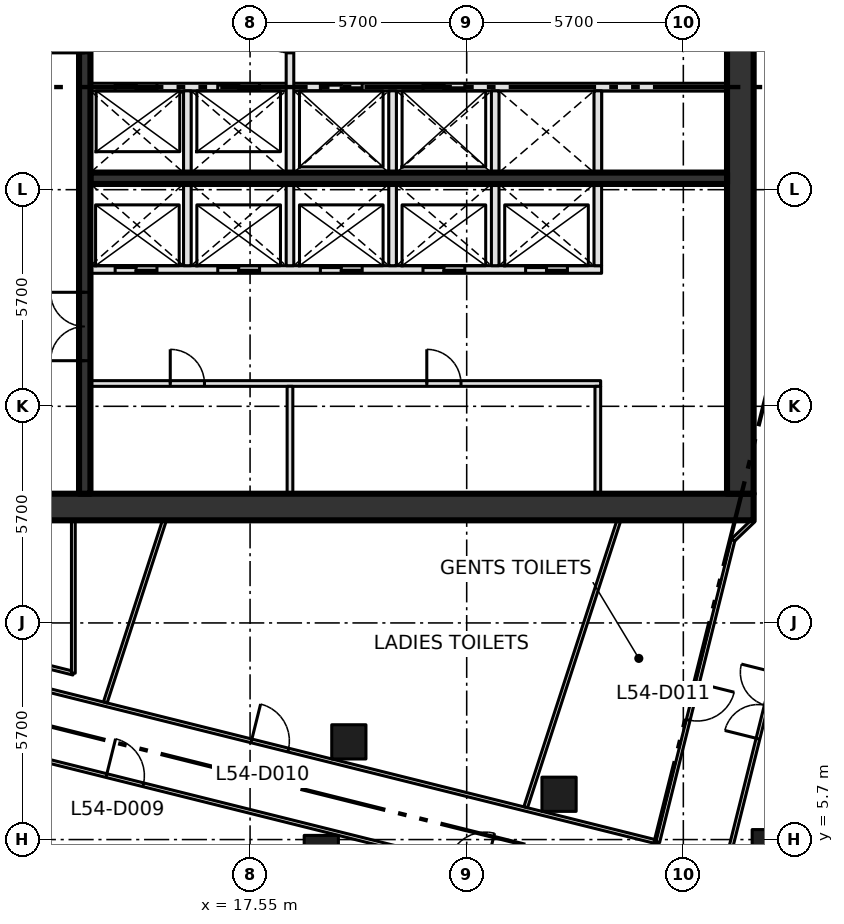
"""IFC4 building model, lengths in metres.
Left out: names, types, materials, properties, quantities, classifications, styles, units other than length and angle.
Written with IfcOpenShell. Run it as: python <this file> out.ifc"""

import sys

from ifc_helpers import new_model, si_unit, direction, frame, frame_2d, origin, origin_2d, place, context, subcontext, project, spatial, rectangle, extrude, element, fill, save


model = new_model("IFC4")
c1 = context("Model", 3, precision=1e-05, world=origin(), true_north=direction((0.0, 1.0)))
c2 = subcontext(c1, "Body", "Model", "MODEL_VIEW")
j1 = project(units=[si_unit("LENGTHUNIT", "METRE"), si_unit("PLANEANGLEUNIT", "RADIAN")], contexts=[c1])
p1 = place(None, origin())
s1 = spatial("IfcSite", under=j1, at=p1, CompositionType="ELEMENT")
p2 = place(p1, origin())
s2 = spatial("IfcBuilding", under=s1, at=p2, CompositionType="ELEMENT")
p3 = place(p2, frame((0.0, 0.0, 238.2)))
s3 = spatial("IfcBuildingStorey", under=s2, at=p3, CompositionType="ELEMENT", Elevation=238.2)
for number, where, z_axis, x_axis in (
    (1, (19.424, 5.36, 0.0), (0.0, 0.0, 1.0), (1.0, 0.0, 0.0)),
    (2, (20.149, 8.271, 0.0), (0.0, 0.0, 1.0), (1.0, 0.0, 0.0)),
    (3, (25.68, 6.892, 0.0), (0.0, 0.0, 1.0), (1.0, 0.0, 0.0)),
    (4, (31.211, 5.513, 0.0), (0.0, 0.0, 1.0), (1.0, 0.0, 0.0)),
):
    element("IfcColumn", number, at=place(p3, frame(where, z_axis=z_axis, x_axis=x_axis)), inside=s3, PredefinedType="COLUMN", context=c2, shape_type="SweptSolid", body=[
        extrude(rectangle(XDim=0.9, YDim=0.9, at=origin_2d()), origin(), (0.0, 0.0, 1.0), 4.2),
    ])
p4 = place(p3, frame((8.0, 14.45, -0.3), z_axis=(0.0, 0.0, 1.0), x_axis=(1.0, 0.0, 0.0)))
e5 = element("IfcWall", 5, at=p4, inside=s3, PredefinedType="SHEAR", context=c2, shape_type="SweptSolid", body=[
    extrude(rectangle(XDim=22.8, YDim=0.7, at=frame_2d((11.4, 0.0))), origin(), (0.0, 0.0, 1.0), 4.2),
])
p5 = place(p4, frame((2.3, 0.0, 0.3)))
e6 = element("IfcOpeningElement", 6, at=p5, cuts=e5, PredefinedType="OPENING", context=c2, shape_type="SweptSolid", body=[
    extrude(rectangle(XDim=1.8, YDim=2.1, at=frame_2d((0.9, 1.05))), frame((0.0, 0.36, 0.0), z_axis=(0.0, -1.0, 0.0), x_axis=(1.0, 0.0, 0.0)), (0.0, 0.0, 1.0), 0.72),
])
p6 = place(p3, frame((30.45, 14.8, -0.3), z_axis=(0.0, 0.0, 1.0), x_axis=(0.0, 1.0, 0.0)))
e7 = element("IfcWall", 7, at=p6, inside=s3, PredefinedType="SHEAR", context=c2, shape_type="SweptSolid", body=[
    extrude(rectangle(XDim=20.9, YDim=0.7, at=frame_2d((10.45, 0.0))), origin(), (0.0, 0.0, 1.0), 4.2),
])
p7 = place(p3, frame((13.35, 17.7, 0.0), z_axis=(0.0, 0.0, 1.0), x_axis=(1.0, 0.0, 0.0)))
e8 = element("IfcWall", 8, at=p7, inside=s3, PredefinedType="PARTITIONING", context=c2, shape_type="SweptSolid", body=[
    extrude(rectangle(XDim=13.425, YDim=0.15, at=frame_2d((6.712, 0.0))), origin(), (0.0, 0.0, 1.0), 3.9),
])
p8 = place(p7, frame((2.1, 0.0, 0.0)))
e9 = element("IfcOpeningElement", 9, at=p8, cuts=e8, PredefinedType="OPENING", context=c2, shape_type="SweptSolid", body=[
    extrude(rectangle(XDim=0.9, YDim=2.1, at=frame_2d((0.45, 1.05))), frame((0.0, 0.085, 0.0), z_axis=(0.0, -1.0, 0.0), x_axis=(1.0, 0.0, 0.0)), (0.0, 0.0, 1.0), 0.17),
])
p9 = place(p7, frame((8.85, 0.0, 0.0)))
e10 = element("IfcOpeningElement", 10, at=p9, cuts=e8, PredefinedType="OPENING", context=c2, shape_type="SweptSolid", body=[
    extrude(rectangle(XDim=0.9, YDim=2.1, at=frame_2d((0.45, 1.05))), frame((0.0, 0.085, 0.0), z_axis=(0.0, -1.0, 0.0), x_axis=(1.0, 0.0, 0.0)), (0.0, 0.0, 1.0), 0.17),
])
p10 = place(p3, frame((13.35, 20.7, 0.0), z_axis=(0.0, 0.0, 1.0), x_axis=(1.0, 0.0, 0.0)))
e11 = element("IfcWall", 11, at=p10, inside=s3, PredefinedType="SOLIDWALL", context=c2, shape_type="SweptSolid", body=[
    extrude(rectangle(XDim=13.45, YDim=0.2, at=frame_2d((6.725, 0.0))), origin(), (0.0, 0.0, 1.0), 3.9),
])
p11 = place(p10, frame((0.65, 0.0, 0.0)))
e12 = element("IfcOpeningElement", 12, at=p11, cuts=e11, PredefinedType="OPENING", context=c2, shape_type="SweptSolid", body=[
    extrude(rectangle(XDim=1.1, YDim=2.1, at=frame_2d((0.55, 1.05))), frame((0.0, 0.11, 0.0), z_axis=(0.0, -1.0, 0.0), x_axis=(1.0, 0.0, 0.0)), (0.0, 0.0, 1.0), 0.22),
])
p12 = place(p10, frame((3.35, 0.0, 0.0)))
e13 = element("IfcOpeningElement", 13, at=p12, cuts=e11, PredefinedType="OPENING", context=c2, shape_type="SweptSolid", body=[
    extrude(rectangle(XDim=1.1, YDim=2.1, at=frame_2d((0.55, 1.05))), frame((0.0, 0.11, 0.0), z_axis=(0.0, -1.0, 0.0), x_axis=(1.0, 0.0, 0.0)), (0.0, 0.0, 1.0), 0.22),
])
p13 = place(p10, frame((6.05, 0.0, 0.0)))
e14 = element("IfcOpeningElement", 14, at=p13, cuts=e11, PredefinedType="OPENING", context=c2, shape_type="SweptSolid", body=[
    extrude(rectangle(XDim=1.1, YDim=2.1, at=frame_2d((0.55, 1.05))), frame((0.0, 0.11, 0.0), z_axis=(0.0, -1.0, 0.0), x_axis=(1.0, 0.0, 0.0)), (0.0, 0.0, 1.0), 0.22),
])
p14 = place(p10, frame((8.75, 0.0, 0.0)))
e15 = element("IfcOpeningElement", 15, at=p14, cuts=e11, PredefinedType="OPENING", context=c2, shape_type="SweptSolid", body=[
    extrude(rectangle(XDim=1.1, YDim=2.1, at=frame_2d((0.55, 1.05))), frame((0.0, 0.11, 0.0), z_axis=(0.0, -1.0, 0.0), x_axis=(1.0, 0.0, 0.0)), (0.0, 0.0, 1.0), 0.22),
])
p15 = place(p10, frame((11.45, 0.0, 0.0)))
e16 = element("IfcOpeningElement", 16, at=p15, cuts=e11, PredefinedType="OPENING", context=c2, shape_type="SweptSolid", body=[
    extrude(rectangle(XDim=1.1, YDim=2.1, at=frame_2d((0.55, 1.05))), frame((0.0, 0.11, 0.0), z_axis=(0.0, -1.0, 0.0), x_axis=(1.0, 0.0, 0.0)), (0.0, 0.0, 1.0), 0.22),
])
p16 = place(p3, frame((13.35, 23.1, 0.0), z_axis=(0.0, 0.0, 1.0), x_axis=(1.0, 0.0, 0.0)))
e17 = element("IfcWall", 17, at=p16, inside=s3, PredefinedType="SHEAR", context=c2, shape_type="SweptSolid", body=[
    extrude(rectangle(XDim=16.75, YDim=0.3, at=frame_2d((8.375, 0.0))), origin(), (0.0, 0.0, 1.0), 3.9),
])
p17 = place(p3, frame((13.35, 25.5, 0.0), z_axis=(0.0, 0.0, 1.0), x_axis=(1.0, 0.0, 0.0)))
e18 = element("IfcWall", 18, at=p17, inside=s3, PredefinedType="SOLIDWALL", context=c2, shape_type="SweptSolid", body=[
    extrude(rectangle(XDim=16.75, YDim=0.2, at=frame_2d((8.375, 0.0))), origin(), (0.0, 0.0, 1.0), 3.9),
])
p18 = place(p17, frame((0.65, 0.0, 0.0)))
e19 = element("IfcOpeningElement", 19, at=p18, cuts=e18, PredefinedType="OPENING", context=c2, shape_type="SweptSolid", body=[
    extrude(rectangle(XDim=1.1, YDim=2.1, at=frame_2d((0.55, 1.05))), frame((0.0, 0.11, 0.0), z_axis=(0.0, -1.0, 0.0), x_axis=(1.0, 0.0, 0.0)), (0.0, 0.0, 1.0), 0.22),
])
p19 = place(p17, frame((3.35, 0.0, 0.0)))
e20 = element("IfcOpeningElement", 20, at=p19, cuts=e18, PredefinedType="OPENING", context=c2, shape_type="SweptSolid", body=[
    extrude(rectangle(XDim=1.1, YDim=2.1, at=frame_2d((0.55, 1.05))), frame((0.0, 0.11, 0.0), z_axis=(0.0, -1.0, 0.0), x_axis=(1.0, 0.0, 0.0)), (0.0, 0.0, 1.0), 0.22),
])
p20 = place(p17, frame((6.05, 0.0, 0.0)))
e21 = element("IfcOpeningElement", 21, at=p20, cuts=e18, PredefinedType="OPENING", context=c2, shape_type="SweptSolid", body=[
    extrude(rectangle(XDim=1.1, YDim=2.1, at=frame_2d((0.55, 1.05))), frame((0.0, 0.11, 0.0), z_axis=(0.0, -1.0, 0.0), x_axis=(1.0, 0.0, 0.0)), (0.0, 0.0, 1.0), 0.22),
])
p21 = place(p17, frame((8.75, 0.0, 0.0)))
e22 = element("IfcOpeningElement", 22, at=p21, cuts=e18, PredefinedType="OPENING", context=c2, shape_type="SweptSolid", body=[
    extrude(rectangle(XDim=1.1, YDim=2.1, at=frame_2d((0.55, 1.05))), frame((0.0, 0.11, 0.0), z_axis=(0.0, -1.0, 0.0), x_axis=(1.0, 0.0, 0.0)), (0.0, 0.0, 1.0), 0.22),
])
p22 = place(p3, frame((13.2, 14.8, 0.0), z_axis=(0.0, 0.0, 1.0), x_axis=(0.0, 1.0, 0.0)))
e23 = element("IfcWall", 23, at=p22, inside=s3, PredefinedType="SHEAR", context=c2, shape_type="SweptSolid", body=[
    extrude(rectangle(XDim=20.9, YDim=0.3, at=frame_2d((10.45, 0.0))), origin(), (0.0, 0.0, 1.0), 3.9),
])
p23 = place(p22, frame((3.5, 0.0, 0.0)))
e24 = element("IfcOpeningElement", 24, at=p23, cuts=e23, PredefinedType="OPENING", context=c2, shape_type="SweptSolid", body=[
    extrude(rectangle(XDim=1.8, YDim=2.1, at=frame_2d((0.9, 1.05))), frame((0.0, 0.16, 0.0), z_axis=(0.0, -1.0, 0.0), x_axis=(1.0, 0.0, 0.0)), (0.0, 0.0, 1.0), 0.32),
])
p24 = place(p22, frame((11.6, 0.0, 0.0)))
e25 = element("IfcOpeningElement", 25, at=p24, cuts=e23, PredefinedType="OPENING", context=c2, shape_type="SweptSolid", body=[
    extrude(rectangle(XDim=1.2, YDim=2.1, at=frame_2d((0.6, 1.05))), frame((0.0, 0.16, 0.0), z_axis=(0.0, -1.0, 0.0), x_axis=(1.0, 0.0, 0.0)), (0.0, 0.0, 1.0), 0.32),
])
p25 = place(p3, frame((15.9, 20.8, 0.0), z_axis=(0.0, 0.0, 1.0), x_axis=(0.0, 1.0, 0.0)))
e26 = element("IfcWall", 26, at=p25, inside=s3, PredefinedType="SOLIDWALL", context=c2, shape_type="SweptSolid", body=[
    extrude(rectangle(XDim=4.6, YDim=0.2, at=frame_2d((2.3, 0.0))), origin(), (0.0, 0.0, 1.0), 3.9),
])
p26 = place(p3, frame((18.6, 14.8, 0.0), z_axis=(0.0, 0.0, 1.0), x_axis=(0.0, 1.0, 0.0)))
e27 = element("IfcWall", 27, at=p26, inside=s3, PredefinedType="PARTITIONING", context=c2, shape_type="SweptSolid", body=[
    extrude(rectangle(XDim=2.825, YDim=0.15, at=frame_2d((1.413, 0.0))), origin(), (0.0, 0.0, 1.0), 3.9),
])
p27 = place(p3, frame((18.6, 20.8, 0.0), z_axis=(0.0, 0.0, 1.0), x_axis=(0.0, 1.0, 0.0)))
e28 = element("IfcWall", 28, at=p27, inside=s3, PredefinedType="SOLIDWALL", context=c2, shape_type="SweptSolid", body=[
    extrude(rectangle(XDim=7.6, YDim=0.2, at=frame_2d((3.8, 0.0))), origin(), (0.0, 0.0, 1.0), 3.9),
])
p28 = place(p27, frame((5.6, 0.0, 0.0)))
e29 = element("IfcOpeningElement", 29, at=p28, cuts=e28, PredefinedType="OPENING", context=c2, shape_type="SweptSolid", body=[
    extrude(rectangle(XDim=1.2, YDim=2.1, at=frame_2d((0.6, 1.05))), frame((0.0, 0.11, 0.0), z_axis=(0.0, -1.0, 0.0), x_axis=(1.0, 0.0, 0.0)), (0.0, 0.0, 1.0), 0.22),
])
for number, where, z_axis, x_axis in (
    (30, (21.3, 20.8, 0.0), (0.0, 0.0, 1.0), (0.0, 1.0, 0.0)),
    (31, (24.0, 20.8, 0.0), (0.0, 0.0, 1.0), (0.0, 1.0, 0.0)),
):
    element("IfcWall", number, at=place(p3, frame(where, z_axis=z_axis, x_axis=x_axis)), inside=s3, PredefinedType="SOLIDWALL", context=c2, shape_type="SweptSolid", body=[
        extrude(rectangle(XDim=4.6, YDim=0.2, at=frame_2d((2.3, 0.0))), origin(), (0.0, 0.0, 1.0), 3.9),
    ])
p29 = place(p3, frame((26.7, 14.8, 0.0), z_axis=(0.0, 0.0, 1.0), x_axis=(0.0, 1.0, 0.0)))
e32 = element("IfcWall", 32, at=p29, inside=s3, PredefinedType="PARTITIONING", context=c2, shape_type="SweptSolid", body=[
    extrude(rectangle(XDim=2.825, YDim=0.15, at=frame_2d((1.413, 0.0))), origin(), (0.0, 0.0, 1.0), 3.9),
])
p30 = place(p3, frame((26.7, 20.8, 0.0), z_axis=(0.0, 0.0, 1.0), x_axis=(0.0, 1.0, 0.0)))
e33 = element("IfcWall", 33, at=p30, inside=s3, PredefinedType="SOLIDWALL", context=c2, shape_type="SweptSolid", body=[
    extrude(rectangle(XDim=4.6, YDim=0.2, at=frame_2d((2.3, 0.0))), origin(), (0.0, 0.0, 1.0), 3.9),
])
p31 = place(p3, frame((8.55, 8.685, 0.0), z_axis=(0.0, 0.0, 1.0), x_axis=(0.970297603286, -0.241914367199, 0.0)))
e34 = element("IfcWall", 34, at=p31, inside=s3, PredefinedType="PARTITIONING", context=c2, shape_type="SweptSolid", body=[
    extrude(rectangle(XDim=50.675, YDim=0.1, at=frame_2d((25.337, 0.0))), origin(), (0.0, 0.0, 1.0), 3.9),
])
p32 = place(p31, frame((35.657, 0.0, 0.0)))
e35 = element("IfcOpeningElement", 35, at=p32, cuts=e34, PredefinedType="OPENING", context=c2, shape_type="SweptSolid", body=[
    extrude(rectangle(XDim=1.8, YDim=2.1, at=frame_2d((0.9, 1.05))), frame((0.0, 0.06, 0.0), z_axis=(0.0, -1.0, 0.0), x_axis=(1.0, 0.0, 0.0)), (0.0, 0.0, 1.0), 0.12),
])
p33 = place(p31, frame((14.657, 0.0, 0.0)))
e36 = element("IfcOpeningElement", 36, at=p33, cuts=e34, PredefinedType="OPENING", context=c2, shape_type="SweptSolid", body=[
    extrude(rectangle(XDim=1.0, YDim=2.1, at=frame_2d((0.5, 1.05))), frame((0.0, 0.06, 0.0), z_axis=(0.0, -1.0, 0.0), x_axis=(1.0, 0.0, 0.0)), (0.0, 0.0, 1.0), 0.12),
])
p34 = place(p31, frame((19.357, 0.0, 0.0)))
e37 = element("IfcOpeningElement", 37, at=p34, cuts=e34, PredefinedType="OPENING", context=c2, shape_type="SweptSolid", body=[
    extrude(rectangle(XDim=1.8, YDim=2.1, at=frame_2d((0.9, 1.05))), frame((0.0, 0.06, 0.0), z_axis=(0.0, -1.0, 0.0), x_axis=(1.0, 0.0, 0.0)), (0.0, 0.0, 1.0), 0.12),
])
p35 = place(p31, frame((5.38, 0.0, 0.0)))
e38 = element("IfcOpeningElement", 38, at=p35, cuts=e34, PredefinedType="OPENING", context=c2, shape_type="SweptSolid", body=[
    extrude(rectangle(XDim=1.0, YDim=2.1, at=frame_2d((0.5, 1.05))), frame((0.0, 0.06, 0.0), z_axis=(0.0, -1.0, 0.0), x_axis=(1.0, 0.0, 0.0)), (0.0, 0.0, 1.0), 0.12),
])
p36 = place(p3, frame((8.988, 10.44, 0.0), z_axis=(0.0, 0.0, 1.0), x_axis=(0.970301223092, -0.241899848006, 0.0)))
e39 = element("IfcWall", 39, at=p36, inside=s3, PredefinedType="PARTITIONING", context=c2, shape_type="SweptSolid", body=[
    extrude(rectangle(XDim=19.879, YDim=0.1, at=frame_2d((9.94, 0.0))), origin(), (0.0, 0.0, 1.0), 3.9),
])
p37 = place(p36, frame((8.861, 0.0, 0.0)))
e40 = element("IfcOpeningElement", 40, at=p37, cuts=e39, PredefinedType="OPENING", context=c2, shape_type="SweptSolid", body=[
    extrude(rectangle(XDim=1.0, YDim=2.1, at=frame_2d((0.5, 1.05))), frame((0.0, 0.06, 0.0), z_axis=(0.0, -1.0, 0.0), x_axis=(1.0, 0.0, 0.0)), (0.0, 0.0, 1.0), 0.12),
])
p38 = place(p3, frame((9.9, 10.826, 0.0), z_axis=(0.0, 0.0, 1.0), x_axis=(0.970290953223, -0.241941038466, 0.0)))
e41 = element("IfcWall", 41, at=p38, inside=s3, PredefinedType="PARTITIONING", context=c2, shape_type="SweptSolid", body=[
    extrude(rectangle(XDim=3.092, YDim=0.1, at=frame_2d((1.546, 0.0))), origin(), (0.0, 0.0, 1.0), 3.9),
])
p39 = place(p3, frame((12.9, 10.078, 0.0), z_axis=(0.0, 0.0, 1.0), x_axis=(0.0, 1.0, 0.0)))
e42 = element("IfcWall", 42, at=p39, inside=s3, PredefinedType="PARTITIONING", context=c2, shape_type="SweptSolid", body=[
    extrude(rectangle(XDim=4.022, YDim=0.1, at=frame_2d((2.011, 0.0))), origin(), (0.0, 0.0, 1.0), 3.9),
])
p40 = place(p3, frame((30.12, 5.171, 0.0), z_axis=(0.0, 0.0, 1.0), x_axis=(0.241902913229, 0.970300458915, 0.0)))
e43 = element("IfcWall", 43, at=p40, inside=s3, PredefinedType="PARTITIONING", context=c2, shape_type="SweptSolid", body=[
    extrude(rectangle(XDim=8.172, YDim=0.1, at=frame_2d((4.086, 0.0))), origin(), (0.0, 0.0, 1.0), 3.9),
])
p41 = place(p40, frame((3.28, 0.0, 0.0)))
e44 = element("IfcOpeningElement", 44, at=p41, cuts=e43, PredefinedType="OPENING", context=c2, shape_type="SweptSolid", body=[
    extrude(rectangle(XDim=1.8, YDim=2.1, at=frame_2d((0.9, 1.05))), frame((0.0, 0.06, 0.0), z_axis=(0.0, -1.0, 0.0), x_axis=(1.0, 0.0, 0.0)), (0.0, 0.0, 1.0), 0.12),
])
p42 = place(p3, frame((30.259, 13.583, 0.0), z_axis=(0.0, 0.0, 1.0), x_axis=(-0.241841612879, -0.970315739479, 0.0)))
e45 = element("IfcWall", 45, at=p42, inside=s3, PredefinedType="PARTITIONING", context=c2, shape_type="SweptSolid", body=[
    extrude(rectangle(XDim=8.195, YDim=0.1, at=frame_2d((4.098, 0.0))), origin(), (0.0, 0.0, 1.0), 3.9),
])
p43 = place(p42, frame((3.88, 0.0, 0.0)))
e46 = element("IfcOpeningElement", 46, at=p43, cuts=e45, PredefinedType="OPENING", context=c2, shape_type="SweptSolid", body=[
    extrude(rectangle(XDim=1.0, YDim=2.1, at=frame_2d((0.5, 1.05))), frame((0.0, 0.06, 0.0), z_axis=(0.0, -1.0, 0.0), x_axis=(1.0, 0.0, 0.0)), (0.0, 0.0, 1.0), 0.12),
])
p44 = place(p3, frame((30.8, 14.1, 0.0), z_axis=(0.0, 0.0, 1.0), x_axis=(-0.722911025189, -0.690941133281, 0.0)))
e47 = element("IfcWall", 47, at=p44, inside=s3, PredefinedType="PARTITIONING", context=c2, shape_type="SweptSolid", body=[
    extrude(rectangle(XDim=0.748, YDim=0.1, at=frame_2d((0.374, 0.0))), origin(), (0.0, 0.0, 1.0), 3.9),
])
p45 = place(p3, frame((13.741, 9.31, 0.0), z_axis=(0.0, 0.0, 1.0), x_axis=(0.308976461467, 0.95106968528, 0.0)))
e48 = element("IfcWall", 48, at=p45, inside=s3, PredefinedType="PARTITIONING", context=c2, shape_type="SweptSolid", body=[
    extrude(rectangle(XDim=5.036, YDim=0.1, at=frame_2d((2.518, 0.0))), origin(), (0.0, 0.0, 1.0), 3.9),
])
p46 = place(p3, frame((24.803, 6.552, 0.0), z_axis=(0.0, 0.0, 1.0), x_axis=(0.308946255954, 0.951079497693, 0.0)))
e49 = element("IfcWall", 49, at=p46, inside=s3, PredefinedType="PARTITIONING", context=c2, shape_type="SweptSolid", body=[
    extrude(rectangle(XDim=7.936, YDim=0.1, at=frame_2d((3.968, 0.0))), origin(), (0.0, 0.0, 1.0), 3.9),
])
p47 = place(p11, origin())
e50 = element("IfcDoor", 50, at=p47, inside=s3, OperationType="SLIDING_TO_LEFT", PredefinedType="DOOR", context=c2, shape_type="SweptSolid", body=[
    extrude(rectangle(XDim=1.1, YDim=2.1, at=frame_2d((0.55, 1.05))), frame((0.0, 0.025, 0.0), z_axis=(0.0, -1.0, 0.0), x_axis=(1.0, 0.0, 0.0)), (0.0, 0.0, 1.0), 0.05),
])
fill(e12, e50)
p48 = place(p12, origin())
e51 = element("IfcDoor", 51, at=p48, inside=s3, OperationType="SLIDING_TO_LEFT", PredefinedType="DOOR", context=c2, shape_type="SweptSolid", body=[
    extrude(rectangle(XDim=1.1, YDim=2.1, at=frame_2d((0.55, 1.05))), frame((0.0, 0.025, 0.0), z_axis=(0.0, -1.0, 0.0), x_axis=(1.0, 0.0, 0.0)), (0.0, 0.0, 1.0), 0.05),
])
fill(e13, e51)
p49 = place(p13, origin())
e52 = element("IfcDoor", 52, at=p49, inside=s3, OperationType="SLIDING_TO_LEFT", PredefinedType="DOOR", context=c2, shape_type="SweptSolid", body=[
    extrude(rectangle(XDim=1.1, YDim=2.1, at=frame_2d((0.55, 1.05))), frame((0.0, 0.025, 0.0), z_axis=(0.0, -1.0, 0.0), x_axis=(1.0, 0.0, 0.0)), (0.0, 0.0, 1.0), 0.05),
])
fill(e14, e52)
p50 = place(p14, origin())
e53 = element("IfcDoor", 53, at=p50, inside=s3, OperationType="SLIDING_TO_LEFT", PredefinedType="DOOR", context=c2, shape_type="SweptSolid", body=[
    extrude(rectangle(XDim=1.1, YDim=2.1, at=frame_2d((0.55, 1.05))), frame((0.0, 0.025, 0.0), z_axis=(0.0, -1.0, 0.0), x_axis=(1.0, 0.0, 0.0)), (0.0, 0.0, 1.0), 0.05),
])
fill(e15, e53)
p51 = place(p15, origin())
e54 = element("IfcDoor", 54, at=p51, inside=s3, OperationType="SLIDING_TO_LEFT", PredefinedType="DOOR", context=c2, shape_type="SweptSolid", body=[
    extrude(rectangle(XDim=1.1, YDim=2.1, at=frame_2d((0.55, 1.05))), frame((0.0, 0.025, 0.0), z_axis=(0.0, -1.0, 0.0), x_axis=(1.0, 0.0, 0.0)), (0.0, 0.0, 1.0), 0.05),
])
fill(e16, e54)
p52 = place(p18, origin())
e55 = element("IfcDoor", 55, at=p52, inside=s3, OperationType="SLIDING_TO_LEFT", PredefinedType="DOOR", context=c2, shape_type="SweptSolid", body=[
    extrude(rectangle(XDim=1.1, YDim=2.1, at=frame_2d((0.55, 1.05))), frame((0.0, 0.025, 0.0), z_axis=(0.0, -1.0, 0.0), x_axis=(1.0, 0.0, 0.0)), (0.0, 0.0, 1.0), 0.05),
])
fill(e19, e55)
p53 = place(p19, origin())
e56 = element("IfcDoor", 56, at=p53, inside=s3, OperationType="SLIDING_TO_LEFT", PredefinedType="DOOR", context=c2, shape_type="SweptSolid", body=[
    extrude(rectangle(XDim=1.1, YDim=2.1, at=frame_2d((0.55, 1.05))), frame((0.0, 0.025, 0.0), z_axis=(0.0, -1.0, 0.0), x_axis=(1.0, 0.0, 0.0)), (0.0, 0.0, 1.0), 0.05),
])
fill(e20, e56)
p54 = place(p20, origin())
e57 = element("IfcDoor", 57, at=p54, inside=s3, OperationType="SLIDING_TO_LEFT", PredefinedType="DOOR", context=c2, shape_type="SweptSolid", body=[
    extrude(rectangle(XDim=1.1, YDim=2.1, at=frame_2d((0.55, 1.05))), frame((0.0, 0.025, 0.0), z_axis=(0.0, -1.0, 0.0), x_axis=(1.0, 0.0, 0.0)), (0.0, 0.0, 1.0), 0.05),
])
fill(e21, e57)
p55 = place(p21, origin())
e58 = element("IfcDoor", 58, at=p55, inside=s3, OperationType="SLIDING_TO_LEFT", PredefinedType="DOOR", context=c2, shape_type="SweptSolid", body=[
    extrude(rectangle(XDim=1.1, YDim=2.1, at=frame_2d((0.55, 1.05))), frame((0.0, 0.025, 0.0), z_axis=(0.0, -1.0, 0.0), x_axis=(1.0, 0.0, 0.0)), (0.0, 0.0, 1.0), 0.05),
])
fill(e22, e58)
p56 = place(p8, origin())
e59 = element("IfcDoor", 59, at=p56, inside=s3, OperationType="SINGLE_SWING_LEFT", PredefinedType="DOOR", context=c2, shape_type="SweptSolid", body=[
    extrude(rectangle(XDim=0.9, YDim=2.1, at=frame_2d((0.45, 1.05))), frame((0.0, 0.025, 0.0), z_axis=(0.0, -1.0, 0.0), x_axis=(1.0, 0.0, 0.0)), (0.0, 0.0, 1.0), 0.05),
])
fill(e9, e59)
p57 = place(p9, origin())
e60 = element("IfcDoor", 60, at=p57, inside=s3, OperationType="SINGLE_SWING_LEFT", PredefinedType="DOOR", context=c2, shape_type="SweptSolid", body=[
    extrude(rectangle(XDim=0.9, YDim=2.1, at=frame_2d((0.45, 1.05))), frame((0.0, 0.025, 0.0), z_axis=(0.0, -1.0, 0.0), x_axis=(1.0, 0.0, 0.0)), (0.0, 0.0, 1.0), 0.05),
])
fill(e10, e60)
p58 = place(p23, origin())
e61 = element("IfcDoor", 61, at=p58, inside=s3, OperationType="DOUBLE_DOOR_SINGLE_SWING", PredefinedType="DOOR", context=c2, shape_type="SweptSolid", body=[
    extrude(rectangle(XDim=1.8, YDim=2.1, at=frame_2d((0.9, 1.05))), frame((0.0, 0.025, 0.0), z_axis=(0.0, -1.0, 0.0), x_axis=(1.0, 0.0, 0.0)), (0.0, 0.0, 1.0), 0.05),
])
fill(e24, e61)
p59 = place(p35, origin())
e62 = element("IfcDoor", 62, at=p59, inside=s3, OperationType="SINGLE_SWING_LEFT", PredefinedType="DOOR", context=c2, shape_type="SweptSolid", body=[
    extrude(rectangle(XDim=1.0, YDim=2.1, at=frame_2d((0.5, 1.05))), frame((0.0, 0.025, 0.0), z_axis=(0.0, -1.0, 0.0), x_axis=(1.0, 0.0, 0.0)), (0.0, 0.0, 1.0), 0.05),
])
fill(e38, e62)
p60 = place(p37, origin())
e63 = element("IfcDoor", 63, at=p60, inside=s3, OperationType="SINGLE_SWING_LEFT", PredefinedType="DOOR", context=c2, shape_type="SweptSolid", body=[
    extrude(rectangle(XDim=1.0, YDim=2.1, at=frame_2d((0.5, 1.05))), frame((0.0, 0.025, 0.0), z_axis=(0.0, -1.0, 0.0), x_axis=(1.0, 0.0, 0.0)), (0.0, 0.0, 1.0), 0.05),
])
fill(e40, e63)
p61 = place(p43, origin())
e64 = element("IfcDoor", 64, at=p61, inside=s3, OperationType="SINGLE_SWING_LEFT", PredefinedType="DOOR", context=c2, shape_type="SweptSolid", body=[
    extrude(rectangle(XDim=1.0, YDim=2.1, at=frame_2d((0.5, 1.05))), frame((0.0, 0.025, 0.0), z_axis=(0.0, -1.0, 0.0), x_axis=(1.0, 0.0, 0.0)), (0.0, 0.0, 1.0), 0.05),
])
fill(e46, e64)
p62 = place(p41, origin())
e65 = element("IfcDoor", 65, at=p62, inside=s3, OperationType="DOUBLE_DOOR_SINGLE_SWING", PredefinedType="DOOR", context=c2, shape_type="SweptSolid", body=[
    extrude(rectangle(XDim=1.8, YDim=2.1, at=frame_2d((0.9, 1.05))), frame((0.0, 0.025, 0.0), z_axis=(0.0, -1.0, 0.0), x_axis=(1.0, 0.0, 0.0)), (0.0, 0.0, 1.0), 0.05),
])
fill(e44, e65)
save(model, sys.argv[1])
